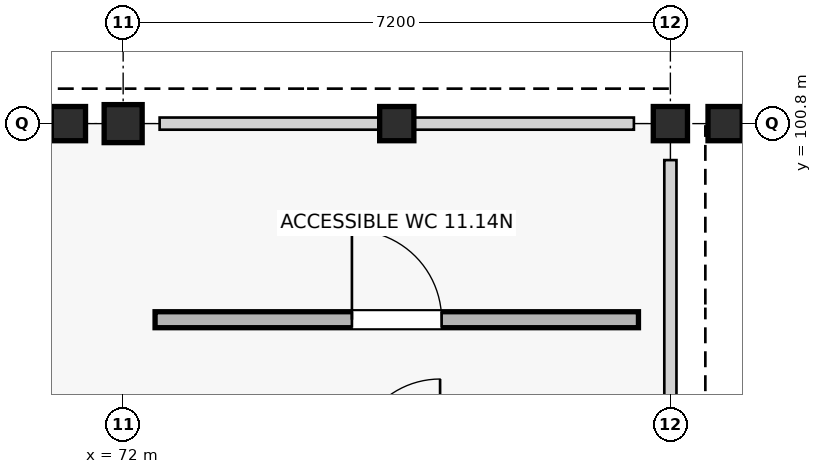
"""IFC4 building model, lengths in metres.
Left out: names, types, materials, properties, quantities, classifications, styles, units other than length and angle.
Written with IfcOpenShell. Run it as: python <this file> out.ifc"""

import sys

from ifc_helpers import new_model, si_unit, direction, frame, frame_2d, origin, origin_2d, place, context, subcontext, project, spatial, rectangle, extrude, element, fill, save


model = new_model("IFC4")
c1 = context("Model", 3, precision=1e-05, world=origin(), true_north=direction((0.0, 1.0)))
c2 = subcontext(c1, "Body", "Model", "MODEL_VIEW")
j1 = project(units=[si_unit("LENGTHUNIT", "METRE"), si_unit("PLANEANGLEUNIT", "RADIAN")], contexts=[c1])
p1 = place(None, origin())
s1 = spatial("IfcSite", under=j1, at=p1, CompositionType="ELEMENT")
p2 = place(p1, origin())
s2 = spatial("IfcBuilding", under=s1, at=p2, CompositionType="ELEMENT")
p3 = place(p2, frame((0.0, 0.0, 4.5)))
s3 = spatial("IfcBuildingStorey", under=s2, at=p3, CompositionType="ELEMENT", Elevation=4.5)
p4 = place(p3, frame((72.0, 100.8, 0.0), z_axis=(0.0, 0.0, 1.0), x_axis=(1.0, 0.0, 0.0)))
e1 = element("IfcColumn", 1, at=p4, inside=s3, PredefinedType="COLUMN", context=c2, shape_type="SweptSolid", body=[
    extrude(rectangle(XDim=0.5, YDim=0.5, at=origin_2d()), origin(), (0.0, 0.0, 1.0), 4.5),
])
p5 = place(p3, frame((79.2, 100.8, 0.0), z_axis=(0.0, 0.0, 1.0), x_axis=(1.0, 0.0, 0.0)))
e2 = element("IfcColumn", 2, at=p5, inside=s3, PredefinedType="COLUMN", context=c2, shape_type="SweptSolid", body=[
    extrude(rectangle(XDim=0.45, YDim=0.45, at=origin_2d()), origin(), (0.0, 0.0, 1.0), 4.5),
])
for number, where, z_axis, x_axis in (
    (3, (71.28, 100.8, 4.075), (0.0, 0.0, 1.0), (1.0, 0.0, 0.0)),
    (4, (75.6, 100.8, 4.075), (0.0, 0.0, 1.0), (1.0, 0.0, 0.0)),
    (5, (79.92, 100.8, 4.075), (0.0, 0.0, 1.0), (1.0, 0.0, 0.0)),
):
    element("IfcColumn", number, at=place(p3, frame(where, z_axis=z_axis, x_axis=x_axis)), inside=s3, PredefinedType="COLUMN", context=c2, shape_type="SweptSolid", body=[
        extrude(rectangle(XDim=0.45, YDim=0.45, at=origin_2d()), origin(), (0.0, 0.0, 1.0), 3.225),
    ])
p6 = place(p3, frame((72.42, 98.22, 0.0), z_axis=(0.0, 0.0, 1.0), x_axis=(1.0, 0.0, 0.0)))
e6 = element("IfcWall", 6, at=p6, inside=s3, PredefinedType="PLUMBINGWALL", context=c2, shape_type="SweptSolid", body=[
    extrude(rectangle(XDim=6.36, YDim=0.21, at=frame_2d((3.18, 0.0))), origin(), (0.0, 0.0, 1.0), 3.36),
])
p7 = place(p6, frame((2.59, 0.0, 0.0)))
e7 = element("IfcOpeningElement", 7, at=p7, cuts=e6, PredefinedType="OPENING", context=c2, shape_type="SweptSolid", body=[
    extrude(rectangle(XDim=1.18, YDim=2.14, at=frame_2d((0.59, 1.07))), frame((0.0, 0.115, 0.0), z_axis=(0.0, -1.0, 0.0), x_axis=(1.0, 0.0, 0.0)), (0.0, 0.0, 1.0), 0.23),
])
p8 = place(p7, origin())
e8 = element("IfcDoor", 8, at=p8, inside=s3, OperationType="SINGLE_SWING_LEFT", PredefinedType="DOOR", context=c2, shape_type="SweptSolid", body=[
    extrude(rectangle(XDim=1.18, YDim=2.14, at=frame_2d((0.59, 1.07))), frame((0.0, 0.025, 0.0), z_axis=(0.0, -1.0, 0.0), x_axis=(1.0, 0.0, 0.0)), (0.0, 0.0, 1.0), 0.05),
])
fill(e7, e8)
save(model, sys.argv[1])
